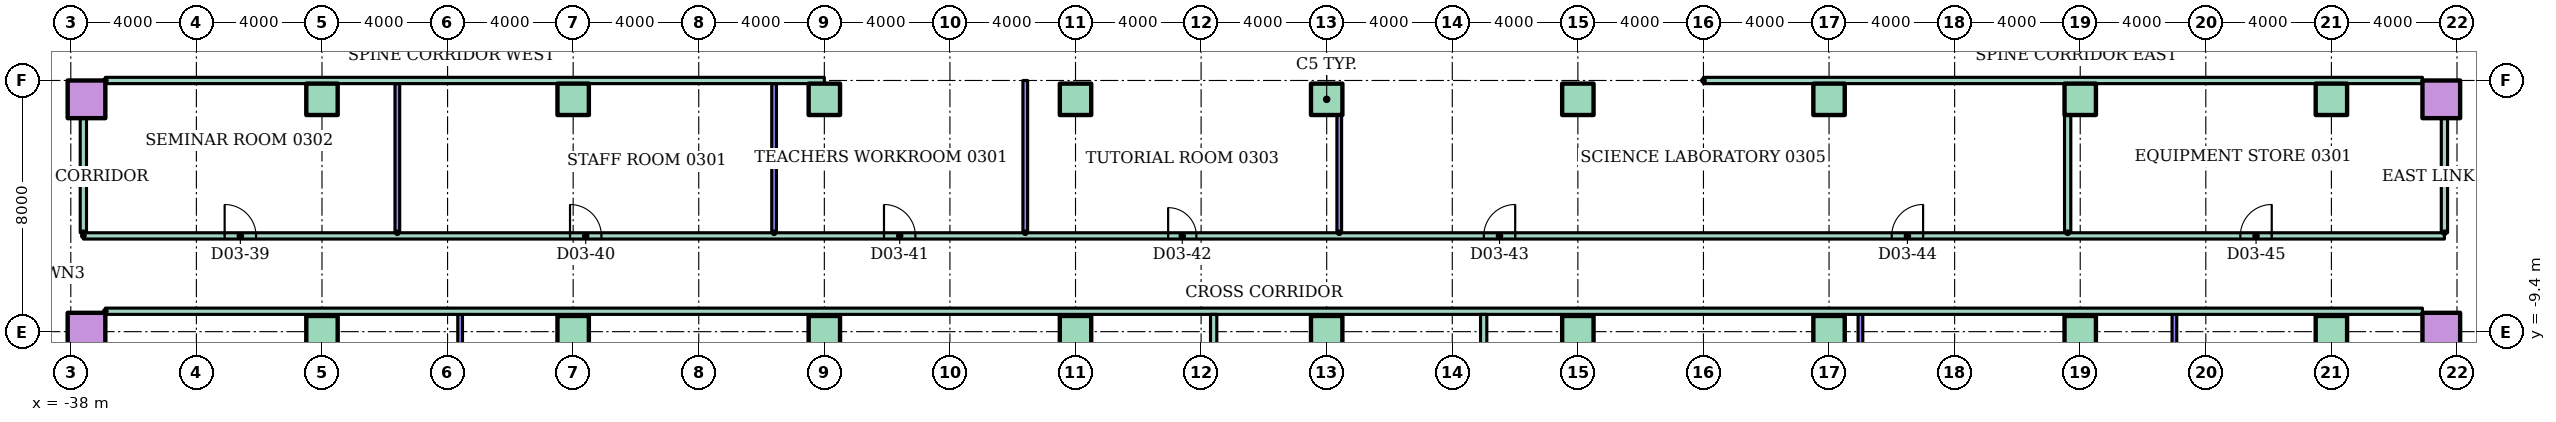
"""IFC4 building model, lengths in metres.
Left out: names, types, materials, properties, quantities, classifications, styles, units other than length and angle.
Written with IfcOpenShell. Run it as: python <this file> out.ifc"""

import sys

from ifc_helpers import new_model, si_unit, direction, frame, frame_2d, origin, origin_2d, place, context, subcontext, project, spatial, rectangle, hollow_rectangle, extrude, element, fill, save


model = new_model("IFC4")
c1 = context("Model", 3, precision=1e-05, world=origin(), true_north=direction((0.0, 1.0)))
c2 = subcontext(c1, "Body", "Model", "MODEL_VIEW")
j1 = project(units=[si_unit("LENGTHUNIT", "METRE"), si_unit("PLANEANGLEUNIT", "RADIAN")], contexts=[c1])
p1 = place(None, origin())
s1 = spatial("IfcSite", under=j1, at=p1, CompositionType="ELEMENT")
p2 = place(p1, origin())
s2 = spatial("IfcBuilding", under=s1, at=p2, CompositionType="ELEMENT")
p3 = place(p2, frame((0.0, 0.0, 14.0)))
s3 = spatial("IfcBuildingStorey", under=s2, at=p3, CompositionType="ELEMENT", Elevation=14.0)
p4 = place(p3, frame((-37.5, -9.4, 0.0)))
e1 = element("IfcColumn", 1, at=p4, inside=s3, PredefinedType="COLUMN", context=c2, shape_type="SweptSolid", body=[
    extrude(hollow_rectangle(XDim=1.2, YDim=1.2, WallThickness=0.06, at=origin_2d()), origin(), (0.0, 0.0, 1.0), 4.0),
])
for number, where in (
    (2, (-30.0, -9.4, 0.0)),
    (3, (-22.0, -9.4, 0.0)),
    (4, (-14.0, -9.4, 0.0)),
    (5, (-6.0, -9.4, 0.0)),
    (6, (2.0, -9.4, 0.0)),
    (7, (10.0, -9.4, 0.0)),
    (8, (18.0, -9.4, 0.0)),
    (9, (26.0, -9.4, 0.0)),
    (10, (34.0, -9.4, 0.0)),
):
    element("IfcColumn", number, at=place(p3, frame(where)), inside=s3, PredefinedType="COLUMN", context=c2, shape_type="SweptSolid", body=[
        extrude(rectangle(XDim=1.0, YDim=1.0, at=origin_2d()), origin(), (0.0, 0.0, 1.0), 4.0),
    ])
for number, where in (
    (11, (37.5, -9.4, 0.0)),
    (12, (-37.5, -2.0, 0.0)),
):
    element("IfcColumn", number, at=place(p3, frame(where)), inside=s3, PredefinedType="COLUMN", context=c2, shape_type="SweptSolid", body=[
        extrude(hollow_rectangle(XDim=1.2, YDim=1.2, WallThickness=0.06, at=origin_2d()), origin(), (0.0, 0.0, 1.0), 4.0),
    ])
for number, where in (
    (13, (-30.0, -2.0, 0.0)),
    (14, (-22.0, -2.0, 0.0)),
    (15, (-14.0, -2.0, 0.0)),
    (16, (-6.0, -2.0, 0.0)),
    (17, (2.0, -2.0, 0.0)),
    (18, (10.0, -2.0, 0.0)),
    (19, (18.0, -2.0, 0.0)),
    (20, (26.0, -2.0, 0.0)),
    (21, (34.0, -2.0, 0.0)),
):
    element("IfcColumn", number, at=place(p3, frame(where)), inside=s3, PredefinedType="COLUMN", context=c2, shape_type="SweptSolid", body=[
        extrude(rectangle(XDim=1.0, YDim=1.0, at=origin_2d()), origin(), (0.0, 0.0, 1.0), 4.0),
    ])
p5 = place(p3, frame((37.5, -2.0, 0.0)))
e22 = element("IfcColumn", 22, at=p5, inside=s3, PredefinedType="COLUMN", context=c2, shape_type="SweptSolid", body=[
    extrude(hollow_rectangle(XDim=1.2, YDim=1.2, WallThickness=0.06, at=origin_2d()), origin(), (0.0, 0.0, 1.0), 4.0),
])
p6 = place(p3, frame((-36.9, -8.75, 0.0)))
e23 = element("IfcWall", 23, at=p6, inside=s3, PredefinedType="PARTITIONING", context=c2, shape_type="SweptSolid", body=[
    extrude(rectangle(XDim=73.8, YDim=0.2, at=frame_2d((36.9, 0.0))), origin(), (0.0, 0.0, 1.0), 3.7),
])
p7 = place(p3, frame((-37.6, -6.35, 0.0)))
e24 = element("IfcWall", 24, at=p7, inside=s3, PredefinedType="PARTITIONING", context=c2, shape_type="SweptSolid", body=[
    extrude(rectangle(XDim=75.2, YDim=0.2, at=frame_2d((37.6, 0.0))), origin(), (0.0, 0.0, 1.0), 3.7),
])
p8 = place(p7, frame((4.5, 0.0, 0.0)))
e25 = element("IfcOpeningElement", 25, at=p8, cuts=e24, PredefinedType="OPENING", context=c2, shape_type="SweptSolid", body=[
    extrude(rectangle(XDim=1.0, YDim=2.1, at=frame_2d((0.5, 1.05))), frame((0.0, 0.11, 0.0), z_axis=(0.0, -1.0, 0.0), x_axis=(1.0, 0.0, 0.0)), (0.0, 0.0, 1.0), 0.22),
])
p9 = place(p7, frame((15.5, 0.0, 0.0)))
e26 = element("IfcOpeningElement", 26, at=p9, cuts=e24, PredefinedType="OPENING", context=c2, shape_type="SweptSolid", body=[
    extrude(rectangle(XDim=1.0, YDim=2.1, at=frame_2d((0.5, 1.05))), frame((0.0, 0.11, 0.0), z_axis=(0.0, -1.0, 0.0), x_axis=(1.0, 0.0, 0.0)), (0.0, 0.0, 1.0), 0.22),
])
p10 = place(p7, frame((25.5, 0.0, 0.0)))
e27 = element("IfcOpeningElement", 27, at=p10, cuts=e24, PredefinedType="OPENING", context=c2, shape_type="SweptSolid", body=[
    extrude(rectangle(XDim=1.0, YDim=2.1, at=frame_2d((0.5, 1.05))), frame((0.0, 0.11, 0.0), z_axis=(0.0, -1.0, 0.0), x_axis=(1.0, 0.0, 0.0)), (0.0, 0.0, 1.0), 0.22),
])
p11 = place(p7, frame((34.55, 0.0, 0.0)))
e28 = element("IfcOpeningElement", 28, at=p11, cuts=e24, PredefinedType="OPENING", context=c2, shape_type="SweptSolid", body=[
    extrude(rectangle(XDim=0.9, YDim=2.1, at=frame_2d((0.45, 1.05))), frame((0.0, 0.11, 0.0), z_axis=(0.0, -1.0, 0.0), x_axis=(1.0, 0.0, 0.0)), (0.0, 0.0, 1.0), 0.22),
])
p12 = place(p7, frame((44.604, 0.0, 0.0)))
e29 = element("IfcOpeningElement", 29, at=p12, cuts=e24, PredefinedType="OPENING", context=c2, shape_type="SweptSolid", body=[
    extrude(rectangle(XDim=1.0, YDim=2.1, at=frame_2d((0.5, 1.05))), frame((0.0, 0.11, 0.0), z_axis=(0.0, -1.0, 0.0), x_axis=(1.0, 0.0, 0.0)), (0.0, 0.0, 1.0), 0.22),
])
p13 = place(p7, frame((57.596, 0.0, 0.0)))
e30 = element("IfcOpeningElement", 30, at=p13, cuts=e24, PredefinedType="OPENING", context=c2, shape_type="SweptSolid", body=[
    extrude(rectangle(XDim=1.0, YDim=2.1, at=frame_2d((0.5, 1.05))), frame((0.0, 0.11, 0.0), z_axis=(0.0, -1.0, 0.0), x_axis=(1.0, 0.0, 0.0)), (0.0, 0.0, 1.0), 0.22),
])
p14 = place(p7, frame((68.7, 0.0, 0.0)))
e31 = element("IfcOpeningElement", 31, at=p14, cuts=e24, PredefinedType="OPENING", context=c2, shape_type="SweptSolid", body=[
    extrude(rectangle(XDim=1.0, YDim=2.1, at=frame_2d((0.5, 1.05))), frame((0.0, 0.11, 0.0), z_axis=(0.0, -1.0, 0.0), x_axis=(1.0, 0.0, 0.0)), (0.0, 0.0, 1.0), 0.22),
])
for number, where in (
    (32, (-36.9, -1.4, 0.0)),
    (33, (14.0, -1.4, 0.0)),
):
    element("IfcWall", number, at=place(p3, frame(where)), inside=s3, PredefinedType="PARTITIONING", context=c2, shape_type="SweptSolid", body=[
        extrude(rectangle(XDim=22.9, YDim=0.2, at=frame_2d((11.45, 0.0))), origin(), (0.0, 0.0, 1.0), 3.7),
    ])
p15 = place(p3, frame((-37.6, -6.25, 0.0), z_axis=(0.0, 0.0, 1.0), x_axis=(0.0, 1.0, 0.0)))
e34 = element("IfcWall", 34, at=p15, inside=s3, PredefinedType="PARTITIONING", context=c2, shape_type="SweptSolid", body=[
    extrude(rectangle(XDim=3.65, YDim=0.2, at=frame_2d((1.825, 0.0))), origin(), (0.0, 0.0, 1.0), 3.7),
])
p16 = place(p3, frame((-27.6, -6.25, 0.0), z_axis=(0.0, 0.0, 1.0), x_axis=(0.0, 1.0, 0.0)))
e35 = element("IfcWall", 35, at=p16, inside=s3, PredefinedType="PARTITIONING", context=c2, shape_type="SweptSolid", body=[
    extrude(rectangle(XDim=4.75, YDim=0.15, at=frame_2d((2.375, 0.0))), origin(), (0.0, 0.0, 1.0), 3.7),
])
p17 = place(p3, frame((-25.6, -19.5, 0.0), z_axis=(0.0, 0.0, 1.0), x_axis=(0.0, 1.0, 0.0)))
e36 = element("IfcWall", 36, at=p17, inside=s3, PredefinedType="PARTITIONING", context=c2, shape_type="SweptSolid", body=[
    extrude(rectangle(XDim=10.65, YDim=0.15, at=frame_2d((5.325, 0.0))), origin(), (0.0, 0.0, 1.0), 3.7),
])
p18 = place(p3, frame((-15.6, -6.25, 0.0), z_axis=(0.0, 0.0, 1.0), x_axis=(0.0, 1.0, 0.0)))
e37 = element("IfcWall", 37, at=p18, inside=s3, PredefinedType="PARTITIONING", context=c2, shape_type="SweptSolid", body=[
    extrude(rectangle(XDim=4.75, YDim=0.15, at=frame_2d((2.375, 0.0))), origin(), (0.0, 0.0, 1.0), 3.7),
])
p19 = place(p3, frame((-7.6, -6.25, 0.0), z_axis=(0.0, 0.0, 1.0), x_axis=(0.0, 1.0, 0.0)))
e38 = element("IfcWall", 38, at=p19, inside=s3, PredefinedType="PARTITIONING", context=c2, shape_type="SweptSolid", body=[
    extrude(rectangle(XDim=4.85, YDim=0.15, at=frame_2d((2.425, 0.0))), origin(), (0.0, 0.0, 1.0), 3.7),
])
p20 = place(p3, frame((-1.6, -19.5, 0.0), z_axis=(0.0, 0.0, 1.0), x_axis=(0.0, 1.0, 0.0)))
e39 = element("IfcWall", 39, at=p20, inside=s3, PredefinedType="PARTITIONING", context=c2, shape_type="SweptSolid", body=[
    extrude(rectangle(XDim=10.65, YDim=0.2, at=frame_2d((5.325, 0.0))), origin(), (0.0, 0.0, 1.0), 3.7),
])
p21 = place(p3, frame((2.4, -6.25, 0.0), z_axis=(0.0, 0.0, 1.0), x_axis=(0.0, 1.0, 0.0)))
e40 = element("IfcWall", 40, at=p21, inside=s3, PredefinedType="PARTITIONING", context=c2, shape_type="SweptSolid", body=[
    extrude(rectangle(XDim=3.75, YDim=0.15, at=frame_2d((1.875, 0.0))), origin(), (0.0, 0.0, 1.0), 3.7),
])
p22 = place(p3, frame((7.0, -19.5, 0.0), z_axis=(0.0, 0.0, 1.0), x_axis=(0.0, 1.0, 0.0)))
e41 = element("IfcWall", 41, at=p22, inside=s3, PredefinedType="PARTITIONING", context=c2, shape_type="SweptSolid", body=[
    extrude(rectangle(XDim=10.65, YDim=0.2, at=frame_2d((5.325, 0.0))), origin(), (0.0, 0.0, 1.0), 3.7),
])
p23 = place(p3, frame((19.0, -19.5, 0.0), z_axis=(0.0, 0.0, 1.0), x_axis=(0.0, 1.0, 0.0)))
e42 = element("IfcWall", 42, at=p23, inside=s3, PredefinedType="PARTITIONING", context=c2, shape_type="SweptSolid", body=[
    extrude(rectangle(XDim=10.65, YDim=0.15, at=frame_2d((5.325, 0.0))), origin(), (0.0, 0.0, 1.0), 3.7),
])
p24 = place(p3, frame((25.6, -6.25, 0.0), z_axis=(0.0, 0.0, 1.0), x_axis=(0.0, 1.0, 0.0)))
e43 = element("IfcWall", 43, at=p24, inside=s3, PredefinedType="PARTITIONING", context=c2, shape_type="SweptSolid", body=[
    extrude(rectangle(XDim=3.75, YDim=0.2, at=frame_2d((1.875, 0.0))), origin(), (0.0, 0.0, 1.0), 3.7),
])
p25 = place(p3, frame((29.0, -19.5, 0.0), z_axis=(0.0, 0.0, 1.0), x_axis=(0.0, 1.0, 0.0)))
e44 = element("IfcWall", 44, at=p25, inside=s3, PredefinedType="PARTITIONING", context=c2, shape_type="SweptSolid", body=[
    extrude(rectangle(XDim=10.65, YDim=0.15, at=frame_2d((5.325, 0.0))), origin(), (0.0, 0.0, 1.0), 3.7),
])
p26 = place(p3, frame((37.6, -6.25, 0.0), z_axis=(0.0, 0.0, 1.0), x_axis=(0.0, 1.0, 0.0)))
e45 = element("IfcWall", 45, at=p26, inside=s3, PredefinedType="PARTITIONING", context=c2, shape_type="SweptSolid", body=[
    extrude(rectangle(XDim=3.65, YDim=0.2, at=frame_2d((1.825, 0.0))), origin(), (0.0, 0.0, 1.0), 3.7),
])
p27 = place(p8, origin())
e46 = element("IfcDoor", 46, at=p27, inside=s3, OperationType="SINGLE_SWING_LEFT", PredefinedType="DOOR", context=c2, shape_type="SweptSolid", body=[
    extrude(rectangle(XDim=1.0, YDim=2.1, at=frame_2d((0.5, 1.05))), frame((0.0, 0.025, 0.0), z_axis=(0.0, -1.0, 0.0), x_axis=(1.0, 0.0, 0.0)), (0.0, 0.0, 1.0), 0.05),
])
fill(e25, e46)
p28 = place(p9, origin())
e47 = element("IfcDoor", 47, at=p28, inside=s3, OperationType="SINGLE_SWING_LEFT", PredefinedType="DOOR", context=c2, shape_type="SweptSolid", body=[
    extrude(rectangle(XDim=1.0, YDim=2.1, at=frame_2d((0.5, 1.05))), frame((0.0, 0.025, 0.0), z_axis=(0.0, -1.0, 0.0), x_axis=(1.0, 0.0, 0.0)), (0.0, 0.0, 1.0), 0.05),
])
fill(e26, e47)
p29 = place(p10, origin())
e48 = element("IfcDoor", 48, at=p29, inside=s3, OperationType="SINGLE_SWING_LEFT", PredefinedType="DOOR", context=c2, shape_type="SweptSolid", body=[
    extrude(rectangle(XDim=1.0, YDim=2.1, at=frame_2d((0.5, 1.05))), frame((0.0, 0.025, 0.0), z_axis=(0.0, -1.0, 0.0), x_axis=(1.0, 0.0, 0.0)), (0.0, 0.0, 1.0), 0.05),
])
fill(e27, e48)
p30 = place(p11, origin())
e49 = element("IfcDoor", 49, at=p30, inside=s3, OperationType="SINGLE_SWING_LEFT", PredefinedType="DOOR", context=c2, shape_type="SweptSolid", body=[
    extrude(rectangle(XDim=0.9, YDim=2.1, at=frame_2d((0.45, 1.05))), frame((0.0, 0.025, 0.0), z_axis=(0.0, -1.0, 0.0), x_axis=(1.0, 0.0, 0.0)), (0.0, 0.0, 1.0), 0.05),
])
fill(e28, e49)
p31 = place(p12, origin())
e50 = element("IfcDoor", 50, at=p31, inside=s3, OperationType="SINGLE_SWING_RIGHT", PredefinedType="DOOR", context=c2, shape_type="SweptSolid", body=[
    extrude(rectangle(XDim=1.0, YDim=2.1, at=frame_2d((0.5, 1.05))), frame((0.0, 0.025, 0.0), z_axis=(0.0, -1.0, 0.0), x_axis=(1.0, 0.0, 0.0)), (0.0, 0.0, 1.0), 0.05),
])
fill(e29, e50)
p32 = place(p13, origin())
e51 = element("IfcDoor", 51, at=p32, inside=s3, OperationType="SINGLE_SWING_RIGHT", PredefinedType="DOOR", context=c2, shape_type="SweptSolid", body=[
    extrude(rectangle(XDim=1.0, YDim=2.1, at=frame_2d((0.5, 1.05))), frame((0.0, 0.025, 0.0), z_axis=(0.0, -1.0, 0.0), x_axis=(1.0, 0.0, 0.0)), (0.0, 0.0, 1.0), 0.05),
])
fill(e30, e51)
p33 = place(p14, origin())
e52 = element("IfcDoor", 52, at=p33, inside=s3, OperationType="SINGLE_SWING_RIGHT", PredefinedType="DOOR", context=c2, shape_type="SweptSolid", body=[
    extrude(rectangle(XDim=1.0, YDim=2.1, at=frame_2d((0.5, 1.05))), frame((0.0, 0.025, 0.0), z_axis=(0.0, -1.0, 0.0), x_axis=(1.0, 0.0, 0.0)), (0.0, 0.0, 1.0), 0.05),
])
fill(e31, e52)
save(model, sys.argv[1])
